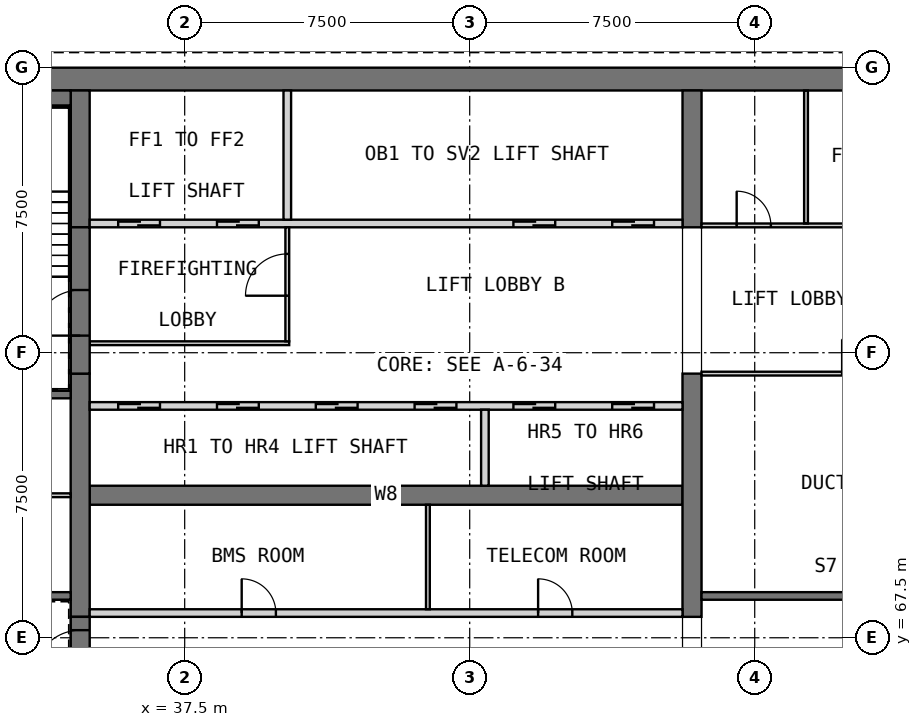
"""IFC4 building model, lengths in metres.
Left out: names, types, materials, properties, quantities, classifications, styles, units other than length and angle.
Written with IfcOpenShell. Run it as: python <this file> out.ifc"""

import sys

from ifc_helpers import new_model, si_unit, direction, frame, frame_2d, origin, place, context, subcontext, project, spatial, rectangle, extrude, element, fill, save


model = new_model("IFC4")
c1 = context("Model", 3, precision=1e-05, world=origin(), true_north=direction((0.0, 1.0)))
c2 = subcontext(c1, "Body", "Model", "MODEL_VIEW")
j1 = project(units=[si_unit("LENGTHUNIT", "METRE"), si_unit("PLANEANGLEUNIT", "RADIAN")], contexts=[c1])
p1 = place(None, origin())
s1 = spatial("IfcSite", under=j1, at=p1, CompositionType="ELEMENT")
p2 = place(p1, origin())
s2 = spatial("IfcBuilding", under=s1, at=p2, CompositionType="ELEMENT")
p3 = place(p2, frame((0.0, 0.0, 258.2)))
s3 = spatial("IfcBuildingStorey", under=s2, at=p3, CompositionType="ELEMENT", Elevation=258.2)
p4 = place(p3, frame((30.0, 82.2, 0.0), z_axis=(0.0, 0.0, 1.0), x_axis=(1.0, 0.0, 0.0)))
e1 = element("IfcWall", 1, at=p4, inside=s3, PredefinedType="SHEAR", context=c2, shape_type="SweptSolid", body=[
    extrude(rectangle(XDim=30.0, YDim=0.6, at=frame_2d((15.0, 0.0))), origin(), (0.0, 0.0, 1.0), 8.0),
])
p5 = place(p3, frame((35.0, 71.25, 0.0), z_axis=(0.0, 0.0, 1.0), x_axis=(1.0, 0.0, 0.0)))
e2 = element("IfcWall", 2, at=p5, inside=s3, PredefinedType="SHEAR", context=c2, shape_type="SweptSolid", body=[
    extrude(rectangle(XDim=15.6, YDim=0.5, at=frame_2d((7.8, 0.0))), origin(), (0.0, 0.0, 1.0), 8.0),
])
p6 = place(p3, frame((34.75, 68.05, 0.0), z_axis=(0.0, 0.0, 1.0), x_axis=(0.0, 1.0, 0.0)))
e3 = element("IfcWall", 3, at=p6, inside=s3, PredefinedType="SHEAR", context=c2, shape_type="SweptSolid", body=[
    extrude(rectangle(XDim=6.4, YDim=0.5, at=frame_2d((3.2, 0.0))), origin(), (0.0, 0.0, 1.0), 8.0),
])
p7 = place(p3, frame((34.75, 78.3, 0.0), z_axis=(0.0, 0.0, 1.0), x_axis=(0.0, 1.0, 0.0)))
e4 = element("IfcWall", 4, at=p7, inside=s3, PredefinedType="SHEAR", context=c2, shape_type="SweptSolid", body=[
    extrude(rectangle(XDim=3.6, YDim=0.5, at=frame_2d((1.8, 0.0))), origin(), (0.0, 0.0, 1.0), 8.0),
])
p8 = place(p3, frame((50.85, 68.05, 0.0), z_axis=(0.0, 0.0, 1.0), x_axis=(0.0, 1.0, 0.0)))
e5 = element("IfcWall", 5, at=p8, inside=s3, PredefinedType="SHEAR", context=c2, shape_type="SweptSolid", body=[
    extrude(rectangle(XDim=6.4, YDim=0.5, at=frame_2d((3.2, 0.0))), origin(), (0.0, 0.0, 1.0), 8.0),
])
p9 = place(p3, frame((50.85, 78.3, 0.0), z_axis=(0.0, 0.0, 1.0), x_axis=(0.0, 1.0, 0.0)))
e6 = element("IfcWall", 6, at=p9, inside=s3, PredefinedType="SHEAR", context=c2, shape_type="SweptSolid", body=[
    extrude(rectangle(XDim=3.6, YDim=0.5, at=frame_2d((1.8, 0.0))), origin(), (0.0, 0.0, 1.0), 8.0),
])
p10 = place(p3, frame((35.0, 68.15, 0.0), z_axis=(0.0, 0.0, 1.0), x_axis=(1.0, 0.0, 0.0)))
e7 = element("IfcWall", 7, at=p10, inside=s3, PredefinedType="PARTITIONING", context=c2, shape_type="SweptSolid", body=[
    extrude(rectangle(XDim=15.6, YDim=0.2, at=frame_2d((7.8, 0.0))), origin(), (0.0, 0.0, 1.0), 7.75),
])
p11 = place(p10, frame((4.0, 0.0, 0.0)))
e8 = element("IfcOpeningElement", 8, at=p11, cuts=e7, PredefinedType="OPENING", context=c2, shape_type="SweptSolid", body=[
    extrude(rectangle(XDim=0.9, YDim=2.1, at=frame_2d((0.45, 1.05))), frame((0.0, 0.11, 0.0), z_axis=(0.0, -1.0, 0.0), x_axis=(1.0, 0.0, 0.0)), (0.0, 0.0, 1.0), 0.22),
])
p12 = place(p10, frame((11.8, 0.0, 0.0)))
e9 = element("IfcOpeningElement", 9, at=p12, cuts=e7, PredefinedType="OPENING", context=c2, shape_type="SweptSolid", body=[
    extrude(rectangle(XDim=0.9, YDim=2.1, at=frame_2d((0.45, 1.05))), frame((0.0, 0.11, 0.0), z_axis=(0.0, -1.0, 0.0), x_axis=(1.0, 0.0, 0.0)), (0.0, 0.0, 1.0), 0.22),
])
p13 = place(p3, frame((43.9, 68.25, 0.0), z_axis=(0.0, 0.0, 1.0), x_axis=(0.0, 1.0, 0.0)))
e10 = element("IfcWall", 10, at=p13, inside=s3, PredefinedType="PARTITIONING", context=c2, shape_type="SweptSolid", body=[
    extrude(rectangle(XDim=2.75, YDim=0.1, at=frame_2d((1.375, 0.0))), origin(), (0.0, 0.0, 1.0), 7.75),
])
p14 = place(p3, frame((35.0, 73.6, 0.0), z_axis=(0.0, 0.0, 1.0), x_axis=(1.0, 0.0, 0.0)))
e11 = element("IfcWall", 11, at=p14, inside=s3, PredefinedType="SOLIDWALL", context=c2, shape_type="SweptSolid", body=[
    extrude(rectangle(XDim=15.6, YDim=0.2, at=frame_2d((7.8, 0.0))), origin(), (0.0, 0.0, 1.0), 8.0),
])
p15 = place(p14, frame((0.75, 0.0, 0.0)))
e12 = element("IfcOpeningElement", 12, at=p15, cuts=e11, PredefinedType="OPENING", context=c2, shape_type="SweptSolid", body=[
    extrude(rectangle(XDim=1.1, YDim=2.1, at=frame_2d((0.55, 1.05))), frame((0.0, 0.11, 0.0), z_axis=(0.0, -1.0, 0.0), x_axis=(1.0, 0.0, 0.0)), (0.0, 0.0, 1.0), 0.22),
])
p16 = place(p14, frame((3.35, 0.0, 0.0)))
e13 = element("IfcOpeningElement", 13, at=p16, cuts=e11, PredefinedType="OPENING", context=c2, shape_type="SweptSolid", body=[
    extrude(rectangle(XDim=1.1, YDim=2.1, at=frame_2d((0.55, 1.05))), frame((0.0, 0.11, 0.0), z_axis=(0.0, -1.0, 0.0), x_axis=(1.0, 0.0, 0.0)), (0.0, 0.0, 1.0), 0.22),
])
p17 = place(p14, frame((5.95, 0.0, 0.0)))
e14 = element("IfcOpeningElement", 14, at=p17, cuts=e11, PredefinedType="OPENING", context=c2, shape_type="SweptSolid", body=[
    extrude(rectangle(XDim=1.1, YDim=2.1, at=frame_2d((0.55, 1.05))), frame((0.0, 0.11, 0.0), z_axis=(0.0, -1.0, 0.0), x_axis=(1.0, 0.0, 0.0)), (0.0, 0.0, 1.0), 0.22),
])
p18 = place(p14, frame((8.55, 0.0, 0.0)))
e15 = element("IfcOpeningElement", 15, at=p18, cuts=e11, PredefinedType="OPENING", context=c2, shape_type="SweptSolid", body=[
    extrude(rectangle(XDim=1.1, YDim=2.1, at=frame_2d((0.55, 1.05))), frame((0.0, 0.11, 0.0), z_axis=(0.0, -1.0, 0.0), x_axis=(1.0, 0.0, 0.0)), (0.0, 0.0, 1.0), 0.22),
])
p19 = place(p14, frame((11.15, 0.0, 0.0)))
e16 = element("IfcOpeningElement", 16, at=p19, cuts=e11, PredefinedType="OPENING", context=c2, shape_type="SweptSolid", body=[
    extrude(rectangle(XDim=1.1, YDim=2.1, at=frame_2d((0.55, 1.05))), frame((0.0, 0.11, 0.0), z_axis=(0.0, -1.0, 0.0), x_axis=(1.0, 0.0, 0.0)), (0.0, 0.0, 1.0), 0.22),
])
p20 = place(p14, frame((13.75, 0.0, 0.0)))
e17 = element("IfcOpeningElement", 17, at=p20, cuts=e11, PredefinedType="OPENING", context=c2, shape_type="SweptSolid", body=[
    extrude(rectangle(XDim=1.1, YDim=2.1, at=frame_2d((0.55, 1.05))), frame((0.0, 0.11, 0.0), z_axis=(0.0, -1.0, 0.0), x_axis=(1.0, 0.0, 0.0)), (0.0, 0.0, 1.0), 0.22),
])
p21 = place(p3, frame((45.4, 71.5, 0.0), z_axis=(0.0, 0.0, 1.0), x_axis=(0.0, 1.0, 0.0)))
e18 = element("IfcWall", 18, at=p21, inside=s3, PredefinedType="SOLIDWALL", context=c2, shape_type="SweptSolid", body=[
    extrude(rectangle(XDim=2.0, YDim=0.2, at=frame_2d((1.0, 0.0))), origin(), (0.0, 0.0, 1.0), 8.0),
])
p22 = place(p3, frame((35.0, 78.4, 0.0), z_axis=(0.0, 0.0, 1.0), x_axis=(1.0, 0.0, 0.0)))
e19 = element("IfcWall", 19, at=p22, inside=s3, PredefinedType="SOLIDWALL", context=c2, shape_type="SweptSolid", body=[
    extrude(rectangle(XDim=15.6, YDim=0.2, at=frame_2d((7.8, 0.0))), origin(), (0.0, 0.0, 1.0), 8.0),
])
p23 = place(p22, frame((0.75, 0.0, 0.0)))
e20 = element("IfcOpeningElement", 20, at=p23, cuts=e19, PredefinedType="OPENING", context=c2, shape_type="SweptSolid", body=[
    extrude(rectangle(XDim=1.1, YDim=2.1, at=frame_2d((0.55, 1.05))), frame((0.0, 0.11, 0.0), z_axis=(0.0, -1.0, 0.0), x_axis=(1.0, 0.0, 0.0)), (0.0, 0.0, 1.0), 0.22),
])
p24 = place(p22, frame((3.35, 0.0, 0.0)))
e21 = element("IfcOpeningElement", 21, at=p24, cuts=e19, PredefinedType="OPENING", context=c2, shape_type="SweptSolid", body=[
    extrude(rectangle(XDim=1.1, YDim=2.1, at=frame_2d((0.55, 1.05))), frame((0.0, 0.11, 0.0), z_axis=(0.0, -1.0, 0.0), x_axis=(1.0, 0.0, 0.0)), (0.0, 0.0, 1.0), 0.22),
])
p25 = place(p22, frame((11.15, 0.0, 0.0)))
e22 = element("IfcOpeningElement", 22, at=p25, cuts=e19, PredefinedType="OPENING", context=c2, shape_type="SweptSolid", body=[
    extrude(rectangle(XDim=1.1, YDim=2.1, at=frame_2d((0.55, 1.05))), frame((0.0, 0.11, 0.0), z_axis=(0.0, -1.0, 0.0), x_axis=(1.0, 0.0, 0.0)), (0.0, 0.0, 1.0), 0.22),
])
p26 = place(p22, frame((13.75, 0.0, 0.0)))
e23 = element("IfcOpeningElement", 23, at=p26, cuts=e19, PredefinedType="OPENING", context=c2, shape_type="SweptSolid", body=[
    extrude(rectangle(XDim=1.1, YDim=2.1, at=frame_2d((0.55, 1.05))), frame((0.0, 0.11, 0.0), z_axis=(0.0, -1.0, 0.0), x_axis=(1.0, 0.0, 0.0)), (0.0, 0.0, 1.0), 0.22),
])
p27 = place(p3, frame((40.2, 78.5, 0.0), z_axis=(0.0, 0.0, 1.0), x_axis=(0.0, 1.0, 0.0)))
e24 = element("IfcWall", 24, at=p27, inside=s3, PredefinedType="SOLIDWALL", context=c2, shape_type="SweptSolid", body=[
    extrude(rectangle(XDim=3.4, YDim=0.2, at=frame_2d((1.7, 0.0))), origin(), (0.0, 0.0, 1.0), 8.0),
])
p28 = place(p3, frame((35.0, 75.25, 0.0), z_axis=(0.0, 0.0, 1.0), x_axis=(1.0, 0.0, 0.0)))
e25 = element("IfcWall", 25, at=p28, inside=s3, PredefinedType="PARTITIONING", context=c2, shape_type="SweptSolid", body=[
    extrude(rectangle(XDim=5.25, YDim=0.1, at=frame_2d((2.625, 0.0))), origin(), (0.0, 0.0, 1.0), 7.75),
])
p29 = place(p3, frame((40.2, 75.3, 0.0), z_axis=(0.0, 0.0, 1.0), x_axis=(0.0, 1.0, 0.0)))
e26 = element("IfcWall", 26, at=p29, inside=s3, PredefinedType="PARTITIONING", context=c2, shape_type="SweptSolid", body=[
    extrude(rectangle(XDim=3.0, YDim=0.1, at=frame_2d((1.5, 0.0))), origin(), (0.0, 0.0, 1.0), 7.75),
])
p30 = place(p29, frame((1.2, 0.0, 0.0)))
e27 = element("IfcOpeningElement", 27, at=p30, cuts=e26, PredefinedType="OPENING", context=c2, shape_type="SweptSolid", body=[
    extrude(rectangle(XDim=1.1, YDim=2.1, at=frame_2d((0.55, 1.05))), frame((0.0, 0.06, 0.0), z_axis=(0.0, -1.0, 0.0), x_axis=(1.0, 0.0, 0.0)), (0.0, 0.0, 1.0), 0.12),
])
p31 = place(p3, frame((34.75, 64.2, 0.0), z_axis=(0.0, 0.0, 1.0), x_axis=(0.0, 1.0, 0.0)))
e28 = element("IfcWall", 28, at=p31, inside=s3, PredefinedType="SOLIDWALL", context=c2, shape_type="SweptSolid", body=[
    extrude(rectangle(XDim=3.85, YDim=0.5, at=frame_2d((1.925, 0.0))), origin(), (0.0, 0.0, 1.0), 6.8),
])
p32 = place(p31, frame((2.3, 0.0, 0.0)))
e29 = element("IfcOpeningElement", 29, at=p32, cuts=e28, PredefinedType="OPENING", context=c2, shape_type="SweptSolid", body=[
    extrude(rectangle(XDim=1.2, YDim=2.1, at=frame_2d((0.6, 1.05))), frame((0.0, 0.26, 0.0), z_axis=(0.0, -1.0, 0.0), x_axis=(1.0, 0.0, 0.0)), (0.0, 0.0, 1.0), 0.52),
])
p33 = place(p3, frame((34.75, 74.45, 0.0), z_axis=(0.0, 0.0, 1.0), x_axis=(0.0, 1.0, 0.0)))
e30 = element("IfcWall", 30, at=p33, inside=s3, PredefinedType="SOLIDWALL", context=c2, shape_type="SweptSolid", body=[
    extrude(rectangle(XDim=3.85, YDim=0.5, at=frame_2d((1.925, 0.0))), origin(), (0.0, 0.0, 1.0), 6.8),
])
p34 = place(p33, frame((1.0, 0.0, 0.0)))
e31 = element("IfcOpeningElement", 31, at=p34, cuts=e30, PredefinedType="OPENING", context=c2, shape_type="SweptSolid", body=[
    extrude(rectangle(XDim=1.2, YDim=2.1, at=frame_2d((0.6, 1.05))), frame((0.0, 0.26, 0.0), z_axis=(0.0, -1.0, 0.0), x_axis=(1.0, 0.0, 0.0)), (0.0, 0.0, 1.0), 0.52),
])
p35 = place(p3, frame((30.6, 68.6, 0.0), z_axis=(0.0, 0.0, 1.0), x_axis=(1.0, 0.0, 0.0)))
e32 = element("IfcWall", 32, at=p35, inside=s3, PredefinedType="SOLIDWALL", context=c2, shape_type="SweptSolid", body=[
    extrude(rectangle(XDim=3.9, YDim=0.2, at=frame_2d((1.95, 0.0))), origin(), (0.0, 0.0, 1.0), 7.75),
])
p36 = place(p35, frame((1.7, 0.0, 0.0)))
e33 = element("IfcOpeningElement", 33, at=p36, cuts=e32, PredefinedType="OPENING", context=c2, shape_type="SweptSolid", body=[
    extrude(rectangle(XDim=0.9, YDim=2.1, at=frame_2d((0.45, 1.05))), frame((0.0, 0.11, 0.0), z_axis=(0.0, -1.0, 0.0), x_axis=(1.0, 0.0, 0.0)), (0.0, 0.0, 1.0), 0.22),
])
p37 = place(p3, frame((30.6, 73.9, 0.0), z_axis=(0.0, 0.0, 1.0), x_axis=(1.0, 0.0, 0.0)))
e34 = element("IfcWall", 34, at=p37, inside=s3, PredefinedType="SOLIDWALL", context=c2, shape_type="SweptSolid", body=[
    extrude(rectangle(XDim=3.9, YDim=0.2, at=frame_2d((1.95, 0.0))), origin(), (0.0, 0.0, 1.0), 7.75),
])
p38 = place(p37, frame((1.7, 0.0, 0.0)))
e35 = element("IfcOpeningElement", 35, at=p38, cuts=e34, PredefinedType="OPENING", context=c2, shape_type="SweptSolid", body=[
    extrude(rectangle(XDim=0.9, YDim=2.1, at=frame_2d((0.45, 1.05))), frame((0.0, 0.11, 0.0), z_axis=(0.0, -1.0, 0.0), x_axis=(1.0, 0.0, 0.0)), (0.0, 0.0, 1.0), 0.22),
])
p39 = place(p3, frame((51.1, 68.6, 0.0), z_axis=(0.0, 0.0, 1.0), x_axis=(1.0, 0.0, 0.0)))
e36 = element("IfcWall", 36, at=p39, inside=s3, PredefinedType="SOLIDWALL", context=c2, shape_type="SweptSolid", body=[
    extrude(rectangle(XDim=8.3, YDim=0.2, at=frame_2d((4.15, 0.0))), origin(), (0.0, 0.0, 1.0), 7.75),
])
p40 = place(p3, frame((31.0, 81.7, 0.0), z_axis=(0.0, 0.0, 1.0), x_axis=(1.0, 0.0, 0.0)))
e37 = element("IfcWall", 37, at=p40, inside=s3, PredefinedType="SOLIDWALL", context=c2, shape_type="SweptSolid", body=[
    extrude(rectangle(XDim=3.5, YDim=0.4, at=frame_2d((1.75, 0.0))), origin(), (0.0, 0.0, 1.0), 7.75),
])
p41 = place(p3, frame((30.6, 71.25, 0.0), z_axis=(0.0, 0.0, 1.0), x_axis=(1.0, 0.0, 0.0)))
e38 = element("IfcWall", 38, at=p41, inside=s3, PredefinedType="PARTITIONING", context=c2, shape_type="SweptSolid", body=[
    extrude(rectangle(XDim=3.9, YDim=0.1, at=frame_2d((1.95, 0.0))), origin(), (0.0, 0.0, 1.0), 7.75),
])
p42 = place(p3, frame((51.1, 74.45, 0.0), z_axis=(0.0, 0.0, 1.0), x_axis=(1.0, 0.0, 0.0)))
e39 = element("IfcWall", 39, at=p42, inside=s3, PredefinedType="PARTITIONING", context=c2, shape_type="SweptSolid", body=[
    extrude(rectangle(XDim=8.3, YDim=0.1, at=frame_2d((4.15, 0.0))), origin(), (0.0, 0.0, 1.0), 7.75),
])
p43 = place(p42, frame((3.7, 0.0, 0.0)))
e40 = element("IfcOpeningElement", 40, at=p43, cuts=e39, PredefinedType="OPENING", context=c2, shape_type="SweptSolid", body=[
    extrude(rectangle(XDim=0.9, YDim=2.1, at=frame_2d((0.45, 1.05))), frame((0.0, 0.06, 0.0), z_axis=(0.0, -1.0, 0.0), x_axis=(1.0, 0.0, 0.0)), (0.0, 0.0, 1.0), 0.12),
])
p44 = place(p3, frame((51.1, 78.35, 0.0), z_axis=(0.0, 0.0, 1.0), x_axis=(1.0, 0.0, 0.0)))
e41 = element("IfcWall", 41, at=p44, inside=s3, PredefinedType="PARTITIONING", context=c2, shape_type="SweptSolid", body=[
    extrude(rectangle(XDim=8.3, YDim=0.1, at=frame_2d((4.15, 0.0))), origin(), (0.0, 0.0, 1.0), 7.75),
])
p45 = place(p44, frame((0.925, 0.0, 0.0)))
e42 = element("IfcOpeningElement", 42, at=p45, cuts=e41, PredefinedType="OPENING", context=c2, shape_type="SweptSolid", body=[
    extrude(rectangle(XDim=0.9, YDim=2.1, at=frame_2d((0.45, 1.05))), frame((0.0, 0.06, 0.0), z_axis=(0.0, -1.0, 0.0), x_axis=(1.0, 0.0, 0.0)), (0.0, 0.0, 1.0), 0.12),
])
p46 = place(p44, frame((5.075, 0.0, 0.0)))
e43 = element("IfcOpeningElement", 43, at=p46, cuts=e41, PredefinedType="OPENING", context=c2, shape_type="SweptSolid", body=[
    extrude(rectangle(XDim=0.9, YDim=2.1, at=frame_2d((0.45, 1.05))), frame((0.0, 0.06, 0.0), z_axis=(0.0, -1.0, 0.0), x_axis=(1.0, 0.0, 0.0)), (0.0, 0.0, 1.0), 0.12),
])
p47 = place(p3, frame((53.85, 78.4, 0.0), z_axis=(0.0, 0.0, 1.0), x_axis=(0.0, 1.0, 0.0)))
e44 = element("IfcWall", 44, at=p47, inside=s3, PredefinedType="PARTITIONING", context=c2, shape_type="SweptSolid", body=[
    extrude(rectangle(XDim=3.5, YDim=0.1, at=frame_2d((1.75, 0.0))), origin(), (0.0, 0.0, 1.0), 7.75),
])
p48 = place(p11, origin())
e45 = element("IfcDoor", 45, at=p48, inside=s3, OperationType="SINGLE_SWING_LEFT", PredefinedType="DOOR", context=c2, shape_type="SweptSolid", body=[
    extrude(rectangle(XDim=0.9, YDim=2.1, at=frame_2d((0.45, 1.05))), frame((0.0, 0.025, 0.0), z_axis=(0.0, -1.0, 0.0), x_axis=(1.0, 0.0, 0.0)), (0.0, 0.0, 1.0), 0.05),
])
fill(e8, e45)
p49 = place(p12, origin())
e46 = element("IfcDoor", 46, at=p49, inside=s3, OperationType="SINGLE_SWING_RIGHT", PredefinedType="DOOR", context=c2, shape_type="SweptSolid", body=[
    extrude(rectangle(XDim=0.9, YDim=2.1, at=frame_2d((0.45, 1.05))), frame((0.0, 0.025, 0.0), z_axis=(0.0, -1.0, 0.0), x_axis=(1.0, 0.0, 0.0)), (0.0, 0.0, 1.0), 0.05),
])
fill(e9, e46)
p50 = place(p15, origin())
e47 = element("IfcDoor", 47, at=p50, inside=s3, OperationType="DOUBLE_DOOR_SLIDING", PredefinedType="DOOR", context=c2, shape_type="SweptSolid", body=[
    extrude(rectangle(XDim=1.1, YDim=2.1, at=frame_2d((0.55, 1.05))), frame((0.0, 0.025, 0.0), z_axis=(0.0, -1.0, 0.0), x_axis=(1.0, 0.0, 0.0)), (0.0, 0.0, 1.0), 0.05),
])
fill(e12, e47)
p51 = place(p16, origin())
e48 = element("IfcDoor", 48, at=p51, inside=s3, OperationType="DOUBLE_DOOR_SLIDING", PredefinedType="DOOR", context=c2, shape_type="SweptSolid", body=[
    extrude(rectangle(XDim=1.1, YDim=2.1, at=frame_2d((0.55, 1.05))), frame((0.0, 0.025, 0.0), z_axis=(0.0, -1.0, 0.0), x_axis=(1.0, 0.0, 0.0)), (0.0, 0.0, 1.0), 0.05),
])
fill(e13, e48)
p52 = place(p17, origin())
e49 = element("IfcDoor", 49, at=p52, inside=s3, OperationType="DOUBLE_DOOR_SLIDING", PredefinedType="DOOR", context=c2, shape_type="SweptSolid", body=[
    extrude(rectangle(XDim=1.1, YDim=2.1, at=frame_2d((0.55, 1.05))), frame((0.0, 0.025, 0.0), z_axis=(0.0, -1.0, 0.0), x_axis=(1.0, 0.0, 0.0)), (0.0, 0.0, 1.0), 0.05),
])
fill(e14, e49)
p53 = place(p18, origin())
e50 = element("IfcDoor", 50, at=p53, inside=s3, OperationType="DOUBLE_DOOR_SLIDING", PredefinedType="DOOR", context=c2, shape_type="SweptSolid", body=[
    extrude(rectangle(XDim=1.1, YDim=2.1, at=frame_2d((0.55, 1.05))), frame((0.0, 0.025, 0.0), z_axis=(0.0, -1.0, 0.0), x_axis=(1.0, 0.0, 0.0)), (0.0, 0.0, 1.0), 0.05),
])
fill(e15, e50)
p54 = place(p19, origin())
e51 = element("IfcDoor", 51, at=p54, inside=s3, OperationType="DOUBLE_DOOR_SLIDING", PredefinedType="DOOR", context=c2, shape_type="SweptSolid", body=[
    extrude(rectangle(XDim=1.1, YDim=2.1, at=frame_2d((0.55, 1.05))), frame((0.0, 0.025, 0.0), z_axis=(0.0, -1.0, 0.0), x_axis=(1.0, 0.0, 0.0)), (0.0, 0.0, 1.0), 0.05),
])
fill(e16, e51)
p55 = place(p20, origin())
e52 = element("IfcDoor", 52, at=p55, inside=s3, OperationType="DOUBLE_DOOR_SLIDING", PredefinedType="DOOR", context=c2, shape_type="SweptSolid", body=[
    extrude(rectangle(XDim=1.1, YDim=2.1, at=frame_2d((0.55, 1.05))), frame((0.0, 0.025, 0.0), z_axis=(0.0, -1.0, 0.0), x_axis=(1.0, 0.0, 0.0)), (0.0, 0.0, 1.0), 0.05),
])
fill(e17, e52)
p56 = place(p23, origin())
e53 = element("IfcDoor", 53, at=p56, inside=s3, OperationType="DOUBLE_DOOR_SLIDING", PredefinedType="DOOR", context=c2, shape_type="SweptSolid", body=[
    extrude(rectangle(XDim=1.1, YDim=2.1, at=frame_2d((0.55, 1.05))), frame((0.0, 0.025, 0.0), z_axis=(0.0, -1.0, 0.0), x_axis=(1.0, 0.0, 0.0)), (0.0, 0.0, 1.0), 0.05),
])
fill(e20, e53)
p57 = place(p24, origin())
e54 = element("IfcDoor", 54, at=p57, inside=s3, OperationType="DOUBLE_DOOR_SLIDING", PredefinedType="DOOR", context=c2, shape_type="SweptSolid", body=[
    extrude(rectangle(XDim=1.1, YDim=2.1, at=frame_2d((0.55, 1.05))), frame((0.0, 0.025, 0.0), z_axis=(0.0, -1.0, 0.0), x_axis=(1.0, 0.0, 0.0)), (0.0, 0.0, 1.0), 0.05),
])
fill(e21, e54)
p58 = place(p25, origin())
e55 = element("IfcDoor", 55, at=p58, inside=s3, OperationType="DOUBLE_DOOR_SLIDING", PredefinedType="DOOR", context=c2, shape_type="SweptSolid", body=[
    extrude(rectangle(XDim=1.1, YDim=2.1, at=frame_2d((0.55, 1.05))), frame((0.0, 0.025, 0.0), z_axis=(0.0, -1.0, 0.0), x_axis=(1.0, 0.0, 0.0)), (0.0, 0.0, 1.0), 0.05),
])
fill(e22, e55)
p59 = place(p26, origin())
e56 = element("IfcDoor", 56, at=p59, inside=s3, OperationType="DOUBLE_DOOR_SLIDING", PredefinedType="DOOR", context=c2, shape_type="SweptSolid", body=[
    extrude(rectangle(XDim=1.1, YDim=2.1, at=frame_2d((0.55, 1.05))), frame((0.0, 0.025, 0.0), z_axis=(0.0, -1.0, 0.0), x_axis=(1.0, 0.0, 0.0)), (0.0, 0.0, 1.0), 0.05),
])
fill(e23, e56)
p60 = place(p30, origin())
e57 = element("IfcDoor", 57, at=p60, inside=s3, OperationType="SINGLE_SWING_LEFT", PredefinedType="DOOR", context=c2, shape_type="SweptSolid", body=[
    extrude(rectangle(XDim=1.1, YDim=2.1, at=frame_2d((0.55, 1.05))), frame((0.0, 0.025, 0.0), z_axis=(0.0, -1.0, 0.0), x_axis=(1.0, 0.0, 0.0)), (0.0, 0.0, 1.0), 0.05),
])
fill(e27, e57)
p61 = place(p32, origin())
e58 = element("IfcDoor", 58, at=p61, inside=s3, OperationType="SINGLE_SWING_LEFT", PredefinedType="DOOR", context=c2, shape_type="SweptSolid", body=[
    extrude(rectangle(XDim=1.2, YDim=2.1, at=frame_2d((0.6, 1.05))), frame((0.0, 0.025, 0.0), z_axis=(0.0, -1.0, 0.0), x_axis=(1.0, 0.0, 0.0)), (0.0, 0.0, 1.0), 0.05),
])
fill(e29, e58)
p62 = place(p34, origin())
e59 = element("IfcDoor", 59, at=p62, inside=s3, OperationType="SINGLE_SWING_RIGHT", PredefinedType="DOOR", context=c2, shape_type="SweptSolid", body=[
    extrude(rectangle(XDim=1.2, YDim=2.1, at=frame_2d((0.6, 1.05))), frame((0.0, 0.025, 0.0), z_axis=(0.0, -1.0, 0.0), x_axis=(1.0, 0.0, 0.0)), (0.0, 0.0, 1.0), 0.05),
])
fill(e31, e59)
p63 = place(p45, origin())
e60 = element("IfcDoor", 60, at=p63, inside=s3, OperationType="SINGLE_SWING_LEFT", PredefinedType="DOOR", context=c2, shape_type="SweptSolid", body=[
    extrude(rectangle(XDim=0.9, YDim=2.1, at=frame_2d((0.45, 1.05))), frame((0.0, 0.025, 0.0), z_axis=(0.0, -1.0, 0.0), x_axis=(1.0, 0.0, 0.0)), (0.0, 0.0, 1.0), 0.05),
])
fill(e42, e60)
save(model, sys.argv[1])
